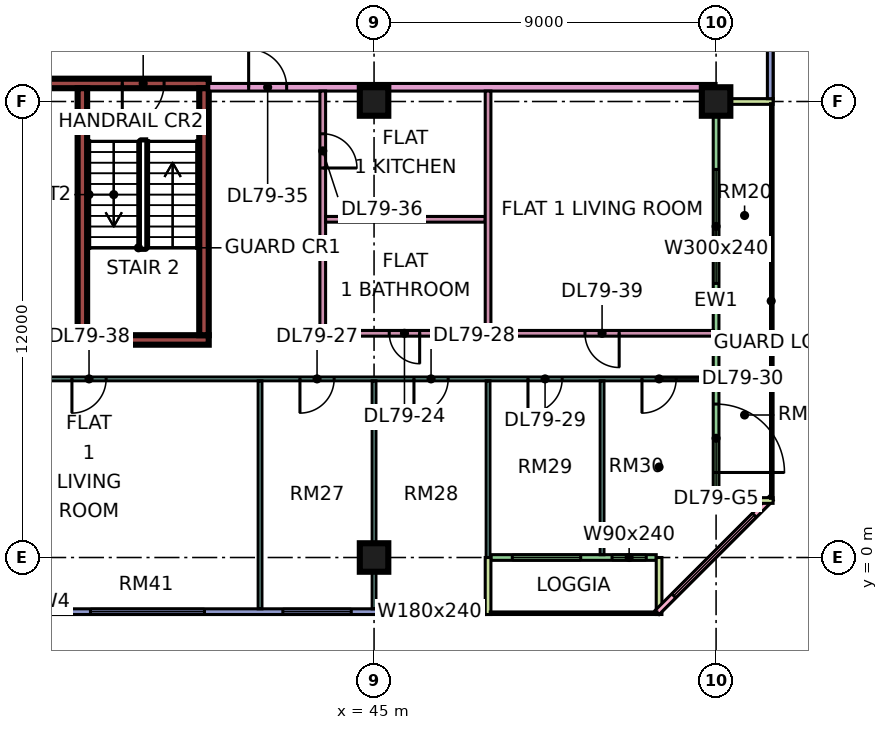
"""IFC4 building model, lengths in metres.
Left out: names, types, materials, properties, quantities, classifications, styles, units other than length and angle.
Written with IfcOpenShell. Run it as: python <this file> out.ifc"""

import sys

from ifc_helpers import new_model, si_unit, direction, frame, frame_2d, origin, origin_2d, place, context, subcontext, project, spatial, rectangle, extrude, element, fill, save


model = new_model("IFC4")
c1 = context("Model", 3, precision=1e-05, world=origin(), true_north=direction((0.0, 1.0)))
c2 = subcontext(c1, "Body", "Model", "MODEL_VIEW")
j1 = project(units=[si_unit("LENGTHUNIT", "METRE"), si_unit("PLANEANGLEUNIT", "RADIAN")], contexts=[c1])
p1 = place(None, origin())
s1 = spatial("IfcSite", under=j1, at=p1, CompositionType="ELEMENT")
p2 = place(p1, origin())
s2 = spatial("IfcBuilding", under=s1, at=p2, CompositionType="ELEMENT")
p3 = place(p2, frame((0.0, 0.0, 342.65)))
s3 = spatial("IfcBuildingStorey", under=s2, at=p3, CompositionType="ELEMENT", Elevation=342.65)
for number, where, z_axis, x_axis in (
    (1, (45.0, 0.0, 0.0), (0.0, 0.0, 1.0), (1.0, 0.0, 0.0)),
    (2, (45.0, 12.0, 0.0), (0.0, 0.0, 1.0), (1.0, 0.0, 0.0)),
    (3, (54.0, 12.0, 0.0), (0.0, 0.0, 1.0), (1.0, 0.0, 0.0)),
):
    element("IfcColumn", number, at=place(p3, frame(where, z_axis=z_axis, x_axis=x_axis)), inside=s3, PredefinedType="COLUMN", context=c2, shape_type="SweptSolid", body=[
        extrude(rectangle(XDim=0.75, YDim=0.75, at=origin_2d()), origin(), (0.0, 0.0, 1.0), 3.75),
    ])
p4 = place(p3, frame((37.2, 5.725, 0.0), z_axis=(0.0, 0.0, 1.0), x_axis=(1.0, 0.0, 0.0)))
e4 = element("IfcWall", 4, at=p4, inside=s3, PredefinedType="SHEAR", context=c2, shape_type="SweptSolid", body=[
    extrude(rectangle(XDim=3.45, YDim=0.25, at=frame_2d((1.725, 0.0))), origin(), (0.0, 0.0, 1.0), 3.75),
])
p5 = place(p3, frame((36.375, 12.475, 0.0), z_axis=(0.0, 0.0, 1.0), x_axis=(1.0, 0.0, 0.0)))
e5 = element("IfcWall", 5, at=p5, inside=s3, PredefinedType="SHEAR", context=c2, shape_type="SweptSolid", body=[
    extrude(rectangle(XDim=4.275, YDim=0.25, at=frame_2d((2.137, 0.0))), origin(), (0.0, 0.0, 1.0), 3.75),
])
p6 = place(p5, frame((2.0, 0.0, 0.0)))
e6 = element("IfcOpeningElement", 6, at=p6, cuts=e5, PredefinedType="OPENING", context=c2, shape_type="SweptSolid", body=[
    extrude(rectangle(XDim=1.1, YDim=2.2, at=frame_2d((0.55, 1.1))), frame((0.0, 0.135, 0.0), z_axis=(0.0, -1.0, 0.0), x_axis=(1.0, 0.0, 0.0)), (0.0, 0.0, 1.0), 0.27),
])
for number, where, z_axis, x_axis in (
    (7, (37.325, 5.85, 0.0), (0.0, 0.0, 1.0), (0.0, 1.0, 0.0)),
    (8, (40.525, 5.85, 0.0), (0.0, 0.0, 1.0), (0.0, 1.0, 0.0)),
):
    element("IfcWall", number, at=place(p3, frame(where, z_axis=z_axis, x_axis=x_axis)), inside=s3, PredefinedType="SHEAR", context=c2, shape_type="SweptSolid", body=[
        extrude(rectangle(XDim=6.5, YDim=0.25, at=frame_2d((3.25, 0.0))), origin(), (0.0, 0.0, 1.0), 3.75),
    ])
p7 = place(p3, frame((36.075, -1.425, 0.0), z_axis=(0.0, 0.0, 1.0), x_axis=(1.0, 0.0, 0.0)))
e9 = element("IfcWall", 9, at=p7, inside=s3, PredefinedType="SOLIDWALL", context=c2, shape_type="SweptSolid", body=[
    extrude(rectangle(XDim=11.85, YDim=0.15, at=frame_2d((5.925, 0.0))), origin(), (0.0, 0.0, 1.0), 3.35),
])
p8 = place(p7, frame((1.462, 0.0, 0.45)))
e10 = element("IfcOpeningElement", 10, at=p8, cuts=e9, PredefinedType="OPENING", context=c2, shape_type="SweptSolid", body=[
    extrude(rectangle(XDim=3.0, YDim=2.4, at=frame_2d((1.5, 1.2))), frame((0.0, 0.085, 0.0), z_axis=(0.0, -1.0, 0.0), x_axis=(1.0, 0.0, 0.0)), (0.0, 0.0, 1.0), 0.17),
])
p9 = place(p7, frame((6.525, 0.0, 0.45)))
e11 = element("IfcOpeningElement", 11, at=p9, cuts=e9, PredefinedType="OPENING", context=c2, shape_type="SweptSolid", body=[
    extrude(rectangle(XDim=1.8, YDim=2.4, at=frame_2d((0.9, 1.2))), frame((0.0, 0.085, 0.0), z_axis=(0.0, -1.0, 0.0), x_axis=(1.0, 0.0, 0.0)), (0.0, 0.0, 1.0), 0.17),
])
p10 = place(p7, frame((9.488, 0.0, 0.45)))
e12 = element("IfcOpeningElement", 12, at=p10, cuts=e9, PredefinedType="OPENING", context=c2, shape_type="SweptSolid", body=[
    extrude(rectangle(XDim=1.8, YDim=2.4, at=frame_2d((0.9, 1.2))), frame((0.0, 0.085, 0.0), z_axis=(0.0, -1.0, 0.0), x_axis=(1.0, 0.0, 0.0)), (0.0, 0.0, 1.0), 0.17),
])
p11 = place(p3, frame((48.075, 0.0, 0.0), z_axis=(0.0, 0.0, 1.0), x_axis=(1.0, 0.0, 0.0)))
e13 = element("IfcWall", 13, at=p11, inside=s3, PredefinedType="SOLIDWALL", context=c2, shape_type="SweptSolid", body=[
    extrude(rectangle(XDim=4.35, YDim=0.15, at=frame_2d((2.175, 0.0))), origin(), (0.0, 0.0, 1.0), 3.35),
])
p12 = place(p11, frame((0.562, 0.0, 0.45)))
e14 = element("IfcOpeningElement", 14, at=p12, cuts=e13, PredefinedType="OPENING", context=c2, shape_type="SweptSolid", body=[
    extrude(rectangle(XDim=1.8, YDim=2.4, at=frame_2d((0.9, 1.2))), frame((0.0, 0.085, 0.0), z_axis=(0.0, -1.0, 0.0), x_axis=(1.0, 0.0, 0.0)), (0.0, 0.0, 1.0), 0.17),
])
p13 = place(p11, frame((3.188, 0.0, 0.45)))
e15 = element("IfcOpeningElement", 15, at=p13, cuts=e13, PredefinedType="OPENING", context=c2, shape_type="SweptSolid", body=[
    extrude(rectangle(XDim=0.9, YDim=2.4, at=frame_2d((0.45, 1.2))), frame((0.0, 0.085, 0.0), z_axis=(0.0, -1.0, 0.0), x_axis=(1.0, 0.0, 0.0)), (0.0, 0.0, 1.0), 0.17),
])
for number, where, z_axis, x_axis in (
    (16, (48.0, -1.5, 0.0), (0.0, 0.0, 1.0), (0.0, 1.0, 0.0)),
    (17, (52.5, -1.5, 0.0), (0.0, 0.0, 1.0), (0.0, 1.0, 0.0)),
):
    element("IfcWall", number, at=place(p3, frame(where, z_axis=z_axis, x_axis=x_axis)), inside=s3, PredefinedType="SOLIDWALL", context=c2, shape_type="SweptSolid", body=[
        extrude(rectangle(XDim=1.5, YDim=0.15, at=frame_2d((0.75, 0.0))), origin(), (0.0, 0.0, 1.0), 3.35),
    ])
p14 = place(p3, frame((52.447, -1.447, 0.0), z_axis=(0.0, 0.0, 1.0), x_axis=(0.707106781187, 0.707106781187, 0.0)))
e18 = element("IfcWall", 18, at=p14, inside=s3, PredefinedType="SOLIDWALL", context=c2, shape_type="SweptSolid", body=[
    extrude(rectangle(XDim=4.243, YDim=0.15, at=frame_2d((2.121, 0.0))), origin(), (0.0, 0.0, 1.0), 3.35),
])
p15 = place(p14, frame((0.621, 0.0, 0.45)))
e19 = element("IfcOpeningElement", 19, at=p15, cuts=e18, PredefinedType="OPENING", context=c2, shape_type="SweptSolid", body=[
    extrude(rectangle(XDim=3.0, YDim=2.4, at=frame_2d((1.5, 1.2))), frame((0.0, 0.085, 0.0), z_axis=(0.0, -1.0, 0.0), x_axis=(1.0, 0.0, 0.0)), (0.0, 0.0, 1.0), 0.17),
])
p16 = place(p3, frame((54.0, 1.575, 0.0), z_axis=(0.0, 0.0, 1.0), x_axis=(0.0, 1.0, 0.0)))
e20 = element("IfcWall", 20, at=p16, inside=s3, PredefinedType="SOLIDWALL", context=c2, shape_type="SweptSolid", body=[
    extrude(rectangle(XDim=10.35, YDim=0.15, at=frame_2d((5.175, 0.0))), origin(), (0.0, 0.0, 1.0), 3.35),
])
p17 = place(p16, frame((0.663, 0.0, 0.0)))
e21 = element("IfcOpeningElement", 21, at=p17, cuts=e20, PredefinedType="OPENING", context=c2, shape_type="SweptSolid", body=[
    extrude(rectangle(XDim=1.8, YDim=2.4, at=frame_2d((0.9, 1.2))), frame((0.0, 0.085, 0.0), z_axis=(0.0, -1.0, 0.0), x_axis=(1.0, 0.0, 0.0)), (0.0, 0.0, 1.0), 0.17),
])
p18 = place(p16, frame((5.637, 0.0, 0.45)))
e22 = element("IfcOpeningElement", 22, at=p18, cuts=e20, PredefinedType="OPENING", context=c2, shape_type="SweptSolid", body=[
    extrude(rectangle(XDim=3.0, YDim=2.4, at=frame_2d((1.5, 1.2))), frame((0.0, 0.085, 0.0), z_axis=(0.0, -1.0, 0.0), x_axis=(1.0, 0.0, 0.0)), (0.0, 0.0, 1.0), 0.17),
])
for number, where, z_axis, x_axis in (
    (23, (55.5, 1.5, 0.0), (0.0, 0.0, 1.0), (-1.0, 0.0, 0.0)),
    (24, (55.5, 12.0, 0.0), (0.0, 0.0, 1.0), (-1.0, 0.0, 0.0)),
):
    element("IfcWall", number, at=place(p3, frame(where, z_axis=z_axis, x_axis=x_axis)), inside=s3, PredefinedType="SOLIDWALL", context=c2, shape_type="SweptSolid", body=[
        extrude(rectangle(XDim=1.5, YDim=0.15, at=frame_2d((0.75, 0.0))), origin(), (0.0, 0.0, 1.0), 3.35),
    ])
p19 = place(p3, frame((55.425, 12.075, 0.0), z_axis=(0.0, 0.0, 1.0), x_axis=(0.0, 1.0, 0.0)))
e25 = element("IfcWall", 25, at=p19, inside=s3, PredefinedType="SOLIDWALL", context=c2, shape_type="SweptSolid", body=[
    extrude(rectangle(XDim=10.425, YDim=0.15, at=frame_2d((5.212, 0.0))), origin(), (0.0, 0.0, 1.0), 3.35),
])
p20 = place(p19, frame((4.575, 0.0, 0.45)))
e26 = element("IfcOpeningElement", 26, at=p20, cuts=e25, PredefinedType="OPENING", context=c2, shape_type="SweptSolid", body=[
    extrude(rectangle(XDim=4.8, YDim=2.4, at=frame_2d((2.4, 1.2))), frame((0.0, 0.085, 0.0), z_axis=(0.0, -1.0, 0.0), x_axis=(1.0, 0.0, 0.0)), (0.0, 0.0, 1.0), 0.17),
])
p21 = place(p3, frame((33.05, 4.7, 0.0), z_axis=(0.0, 0.0, 1.0), x_axis=(1.0, 0.0, 0.0)))
e27 = element("IfcWall", 27, at=p21, inside=s3, PredefinedType="PARTITIONING", context=c2, shape_type="SweptSolid", body=[
    extrude(rectangle(XDim=20.876, YDim=0.1, at=frame_2d((10.438, 0.0))), origin(), (0.0, 0.0, 1.0), 3.35),
])
p22 = place(p21, frame((10.0, 0.0, 0.0)))
e28 = element("IfcOpeningElement", 28, at=p22, cuts=e27, PredefinedType="OPENING", context=c2, shape_type="SweptSolid", body=[
    extrude(rectangle(XDim=0.9, YDim=2.1, at=frame_2d((0.45, 1.05))), frame((0.0, 0.06, 0.0), z_axis=(0.0, -1.0, 0.0), x_axis=(1.0, 0.0, 0.0)), (0.0, 0.0, 1.0), 0.12),
])
p23 = place(p21, frame((13.0, 0.0, 0.0)))
e29 = element("IfcOpeningElement", 29, at=p23, cuts=e27, PredefinedType="OPENING", context=c2, shape_type="SweptSolid", body=[
    extrude(rectangle(XDim=0.9, YDim=2.1, at=frame_2d((0.45, 1.05))), frame((0.0, 0.06, 0.0), z_axis=(0.0, -1.0, 0.0), x_axis=(1.0, 0.0, 0.0)), (0.0, 0.0, 1.0), 0.12),
])
p24 = place(p21, frame((16.0, 0.0, 0.0)))
e30 = element("IfcOpeningElement", 30, at=p24, cuts=e27, PredefinedType="OPENING", context=c2, shape_type="SweptSolid", body=[
    extrude(rectangle(XDim=0.9, YDim=2.1, at=frame_2d((0.45, 1.05))), frame((0.0, 0.06, 0.0), z_axis=(0.0, -1.0, 0.0), x_axis=(1.0, 0.0, 0.0)), (0.0, 0.0, 1.0), 0.12),
])
p25 = place(p21, frame((19.0, 0.0, 0.0)))
e31 = element("IfcOpeningElement", 31, at=p25, cuts=e27, PredefinedType="OPENING", context=c2, shape_type="SweptSolid", body=[
    extrude(rectangle(XDim=0.9, YDim=2.1, at=frame_2d((0.45, 1.05))), frame((0.0, 0.06, 0.0), z_axis=(0.0, -1.0, 0.0), x_axis=(1.0, 0.0, 0.0)), (0.0, 0.0, 1.0), 0.12),
])
p26 = place(p21, frame((4.0, 0.0, 0.0)))
e32 = element("IfcOpeningElement", 32, at=p26, cuts=e27, PredefinedType="OPENING", context=c2, shape_type="SweptSolid", body=[
    extrude(rectangle(XDim=0.9, YDim=2.1, at=frame_2d((0.45, 1.05))), frame((0.0, 0.06, 0.0), z_axis=(0.0, -1.0, 0.0), x_axis=(1.0, 0.0, 0.0)), (0.0, 0.0, 1.0), 0.12),
])
p27 = place(p3, frame((40.65, 12.375, 0.0), z_axis=(0.0, 0.0, 1.0), x_axis=(1.0, 0.0, 0.0)))
e33 = element("IfcWall", 33, at=p27, inside=s3, PredefinedType="PARTITIONING", context=c2, shape_type="SweptSolid", body=[
    extrude(rectangle(XDim=13.35, YDim=0.2, at=frame_2d((6.675, 0.0))), origin(), (0.0, 0.0, 1.0), 3.35),
])
p28 = place(p27, frame((1.05, 0.0, 0.0)))
e34 = element("IfcOpeningElement", 34, at=p28, cuts=e33, PredefinedType="OPENING", context=c2, shape_type="SweptSolid", body=[
    extrude(rectangle(XDim=1.0, YDim=2.1, at=frame_2d((0.5, 1.05))), frame((0.0, 0.11, 0.0), z_axis=(0.0, -1.0, 0.0), x_axis=(1.0, 0.0, 0.0)), (0.0, 0.0, 1.0), 0.22),
])
p29 = place(p3, frame((42.0, -1.35, 0.0), z_axis=(0.0, 0.0, 1.0), x_axis=(0.0, 1.0, 0.0)))
e35 = element("IfcWall", 35, at=p29, inside=s3, PredefinedType="PARTITIONING", context=c2, shape_type="SweptSolid", body=[
    extrude(rectangle(XDim=6.0, YDim=0.1, at=frame_2d((3.0, 0.0))), origin(), (0.0, 0.0, 1.0), 3.35),
])
p30 = place(p3, frame((43.575, 5.9, 0.0), z_axis=(0.0, 0.0, 1.0), x_axis=(1.0, 0.0, 0.0)))
e36 = element("IfcWall", 36, at=p30, inside=s3, PredefinedType="PARTITIONING", context=c2, shape_type="SweptSolid", body=[
    extrude(rectangle(XDim=10.351, YDim=0.15, at=frame_2d((5.176, 0.0))), origin(), (0.0, 0.0, 1.0), 3.35),
])
p31 = place(p30, frame((1.825, 0.0, 0.0)))
e37 = element("IfcOpeningElement", 37, at=p31, cuts=e36, PredefinedType="OPENING", context=c2, shape_type="SweptSolid", body=[
    extrude(rectangle(XDim=0.8, YDim=2.1, at=frame_2d((0.4, 1.05))), frame((0.0, 0.085, 0.0), z_axis=(0.0, -1.0, 0.0), x_axis=(1.0, 0.0, 0.0)), (0.0, 0.0, 1.0), 0.17),
])
p32 = place(p30, frame((6.975, 0.0, 0.0)))
e38 = element("IfcOpeningElement", 38, at=p32, cuts=e36, PredefinedType="OPENING", context=c2, shape_type="SweptSolid", body=[
    extrude(rectangle(XDim=0.9, YDim=2.1, at=frame_2d((0.45, 1.05))), frame((0.0, 0.085, 0.0), z_axis=(0.0, -1.0, 0.0), x_axis=(1.0, 0.0, 0.0)), (0.0, 0.0, 1.0), 0.17),
])
p33 = place(p3, frame((43.65, 5.975, 0.0), z_axis=(0.0, 0.0, 1.0), x_axis=(0.0, 1.0, 0.0)))
e39 = element("IfcWall", 39, at=p33, inside=s3, PredefinedType="PARTITIONING", context=c2, shape_type="SweptSolid", body=[
    extrude(rectangle(XDim=6.3, YDim=0.15, at=frame_2d((3.15, 0.0))), origin(), (0.0, 0.0, 1.0), 3.35),
])
p34 = place(p33, frame((4.275, 0.0, 0.0)))
e40 = element("IfcOpeningElement", 40, at=p34, cuts=e39, PredefinedType="OPENING", context=c2, shape_type="SweptSolid", body=[
    extrude(rectangle(XDim=0.9, YDim=2.1, at=frame_2d((0.45, 1.05))), frame((0.0, 0.085, 0.0), z_axis=(0.0, -1.0, 0.0), x_axis=(1.0, 0.0, 0.0)), (0.0, 0.0, 1.0), 0.17),
])
p35 = place(p3, frame((43.725, 8.9, 0.0), z_axis=(0.0, 0.0, 1.0), x_axis=(1.0, 0.0, 0.0)))
e41 = element("IfcWall", 41, at=p35, inside=s3, PredefinedType="PARTITIONING", context=c2, shape_type="SweptSolid", body=[
    extrude(rectangle(XDim=4.2, YDim=0.15, at=frame_2d((2.1, 0.0))), origin(), (0.0, 0.0, 1.0), 3.35),
])
p36 = place(p3, frame((45.0, -1.351, 0.0), z_axis=(0.0, 0.0, 1.0), x_axis=(0.0, 1.0, 0.0)))
e42 = element("IfcWall", 42, at=p36, inside=s3, PredefinedType="PARTITIONING", context=c2, shape_type="SweptSolid", body=[
    extrude(rectangle(XDim=6.001, YDim=0.1, at=frame_2d((3.0, 0.0))), origin(), (0.0, 0.0, 1.0), 3.35),
])
p37 = place(p3, frame((48.0, 0.0, 0.0), z_axis=(0.0, 0.0, 1.0), x_axis=(0.0, 1.0, 0.0)))
e43 = element("IfcWall", 43, at=p37, inside=s3, PredefinedType="PARTITIONING", context=c2, shape_type="SweptSolid", body=[
    extrude(rectangle(XDim=4.65, YDim=0.1, at=frame_2d((2.325, 0.0))), origin(), (0.0, 0.0, 1.0), 3.35),
])
p38 = place(p3, frame((48.0, 5.975, 0.0), z_axis=(0.0, 0.0, 1.0), x_axis=(0.0, 1.0, 0.0)))
e44 = element("IfcWall", 44, at=p38, inside=s3, PredefinedType="PARTITIONING", context=c2, shape_type="SweptSolid", body=[
    extrude(rectangle(XDim=6.3, YDim=0.15, at=frame_2d((3.15, 0.0))), origin(), (0.0, 0.0, 1.0), 3.35),
])
p39 = place(p3, frame((51.0, 0.074, 0.0), z_axis=(0.0, 0.0, 1.0), x_axis=(0.0, 1.0, 0.0)))
e45 = element("IfcWall", 45, at=p39, inside=s3, PredefinedType="PARTITIONING", context=c2, shape_type="SweptSolid", body=[
    extrude(rectangle(XDim=4.576, YDim=0.1, at=frame_2d((2.288, 0.0))), origin(), (0.0, 0.0, 1.0), 3.35),
])
p40 = place(p8, origin())
e46 = element("IfcWindow", 46, at=p40, inside=s3, PartitioningType="SINGLE_PANEL", PredefinedType="WINDOW", context=c2, shape_type="SweptSolid", body=[
    extrude(rectangle(XDim=3.0, YDim=2.4, at=frame_2d((1.5, 1.2))), frame((0.0, 0.03, 0.0), z_axis=(0.0, -1.0, 0.0), x_axis=(1.0, 0.0, 0.0)), (0.0, 0.0, 1.0), 0.06),
])
fill(e10, e46)
p41 = place(p9, origin())
e47 = element("IfcWindow", 47, at=p41, inside=s3, PartitioningType="SINGLE_PANEL", PredefinedType="WINDOW", context=c2, shape_type="SweptSolid", body=[
    extrude(rectangle(XDim=1.8, YDim=2.4, at=frame_2d((0.9, 1.2))), frame((0.0, 0.03, 0.0), z_axis=(0.0, -1.0, 0.0), x_axis=(1.0, 0.0, 0.0)), (0.0, 0.0, 1.0), 0.06),
])
fill(e11, e47)
p42 = place(p10, origin())
e48 = element("IfcWindow", 48, at=p42, inside=s3, PartitioningType="SINGLE_PANEL", PredefinedType="WINDOW", context=c2, shape_type="SweptSolid", body=[
    extrude(rectangle(XDim=1.8, YDim=2.4, at=frame_2d((0.9, 1.2))), frame((0.0, 0.03, 0.0), z_axis=(0.0, -1.0, 0.0), x_axis=(1.0, 0.0, 0.0)), (0.0, 0.0, 1.0), 0.06),
])
fill(e12, e48)
p43 = place(p12, origin())
e49 = element("IfcWindow", 49, at=p43, inside=s3, PartitioningType="SINGLE_PANEL", PredefinedType="WINDOW", context=c2, shape_type="SweptSolid", body=[
    extrude(rectangle(XDim=1.8, YDim=2.4, at=frame_2d((0.9, 1.2))), frame((0.0, 0.03, 0.0), z_axis=(0.0, -1.0, 0.0), x_axis=(1.0, 0.0, 0.0)), (0.0, 0.0, 1.0), 0.06),
])
fill(e14, e49)
p44 = place(p13, origin())
e50 = element("IfcWindow", 50, at=p44, inside=s3, PartitioningType="SINGLE_PANEL", PredefinedType="WINDOW", context=c2, shape_type="SweptSolid", body=[
    extrude(rectangle(XDim=0.9, YDim=2.4, at=frame_2d((0.45, 1.2))), frame((0.0, 0.03, 0.0), z_axis=(0.0, -1.0, 0.0), x_axis=(1.0, 0.0, 0.0)), (0.0, 0.0, 1.0), 0.06),
])
fill(e15, e50)
p45 = place(p15, origin())
e51 = element("IfcWindow", 51, at=p45, inside=s3, PartitioningType="SINGLE_PANEL", PredefinedType="WINDOW", context=c2, shape_type="SweptSolid", body=[
    extrude(rectangle(XDim=3.0, YDim=2.4, at=frame_2d((1.5, 1.2))), frame((0.0, 0.03, 0.0), z_axis=(0.0, -1.0, 0.0), x_axis=(1.0, 0.0, 0.0)), (0.0, 0.0, 1.0), 0.06),
])
fill(e19, e51)
p46 = place(p17, frame((1.8, 0.0, 0.0), z_axis=(0.0, 0.0, 1.0), x_axis=(-1.0, 0.0, 0.0)))
e52 = element("IfcDoor", 52, at=p46, inside=s3, OperationType="DOUBLE_DOOR_SINGLE_SWING", PredefinedType="DOOR", context=c2, shape_type="SweptSolid", body=[
    extrude(rectangle(XDim=1.8, YDim=2.4, at=frame_2d((0.9, 1.2))), frame((0.0, 0.025, 0.0), z_axis=(0.0, -1.0, 0.0), x_axis=(1.0, 0.0, 0.0)), (0.0, 0.0, 1.0), 0.05),
])
fill(e21, e52)
p47 = place(p18, origin())
e53 = element("IfcWindow", 53, at=p47, inside=s3, PartitioningType="SINGLE_PANEL", PredefinedType="WINDOW", context=c2, shape_type="SweptSolid", body=[
    extrude(rectangle(XDim=3.0, YDim=2.4, at=frame_2d((1.5, 1.2))), frame((0.0, 0.03, 0.0), z_axis=(0.0, -1.0, 0.0), x_axis=(1.0, 0.0, 0.0)), (0.0, 0.0, 1.0), 0.06),
])
fill(e22, e53)
p48 = place(p6, frame((1.1, 0.0, 0.0), z_axis=(0.0, 0.0, 1.0), x_axis=(-1.0, 0.0, 0.0)))
e54 = element("IfcDoor", 54, at=p48, inside=s3, OperationType="SINGLE_SWING_LEFT", PredefinedType="DOOR", context=c2, shape_type="SweptSolid", body=[
    extrude(rectangle(XDim=1.1, YDim=2.2, at=frame_2d((0.55, 1.1))), frame((0.0, 0.025, 0.0), z_axis=(0.0, -1.0, 0.0), x_axis=(1.0, 0.0, 0.0)), (0.0, 0.0, 1.0), 0.05),
])
fill(e6, e54)
p49 = place(p31, origin())
e55 = element("IfcDoor", 55, at=p49, inside=s3, OperationType="SINGLE_SWING_RIGHT", PredefinedType="DOOR", context=c2, shape_type="SweptSolid", body=[
    extrude(rectangle(XDim=0.8, YDim=2.1, at=frame_2d((0.4, 1.05))), frame((0.0, 0.025, 0.0), z_axis=(0.0, -1.0, 0.0), x_axis=(1.0, 0.0, 0.0)), (0.0, 0.0, 1.0), 0.05),
])
fill(e37, e55)
p50 = place(p22, frame((0.9, 0.0, 0.0), z_axis=(0.0, 0.0, 1.0), x_axis=(-1.0, 0.0, 0.0)))
e56 = element("IfcDoor", 56, at=p50, inside=s3, OperationType="SINGLE_SWING_LEFT", PredefinedType="DOOR", context=c2, shape_type="SweptSolid", body=[
    extrude(rectangle(XDim=0.9, YDim=2.1, at=frame_2d((0.45, 1.05))), frame((0.0, 0.025, 0.0), z_axis=(0.0, -1.0, 0.0), x_axis=(1.0, 0.0, 0.0)), (0.0, 0.0, 1.0), 0.05),
])
fill(e28, e56)
p51 = place(p23, frame((0.9, 0.0, 0.0), z_axis=(0.0, 0.0, 1.0), x_axis=(-1.0, 0.0, 0.0)))
e57 = element("IfcDoor", 57, at=p51, inside=s3, OperationType="SINGLE_SWING_LEFT", PredefinedType="DOOR", context=c2, shape_type="SweptSolid", body=[
    extrude(rectangle(XDim=0.9, YDim=2.1, at=frame_2d((0.45, 1.05))), frame((0.0, 0.025, 0.0), z_axis=(0.0, -1.0, 0.0), x_axis=(1.0, 0.0, 0.0)), (0.0, 0.0, 1.0), 0.05),
])
fill(e29, e57)
p52 = place(p24, frame((0.9, 0.0, 0.0), z_axis=(0.0, 0.0, 1.0), x_axis=(-1.0, 0.0, 0.0)))
e58 = element("IfcDoor", 58, at=p52, inside=s3, OperationType="SINGLE_SWING_LEFT", PredefinedType="DOOR", context=c2, shape_type="SweptSolid", body=[
    extrude(rectangle(XDim=0.9, YDim=2.1, at=frame_2d((0.45, 1.05))), frame((0.0, 0.025, 0.0), z_axis=(0.0, -1.0, 0.0), x_axis=(1.0, 0.0, 0.0)), (0.0, 0.0, 1.0), 0.05),
])
fill(e30, e58)
p53 = place(p25, frame((0.9, 0.0, 0.0), z_axis=(0.0, 0.0, 1.0), x_axis=(-1.0, 0.0, 0.0)))
e59 = element("IfcDoor", 59, at=p53, inside=s3, OperationType="SINGLE_SWING_LEFT", PredefinedType="DOOR", context=c2, shape_type="SweptSolid", body=[
    extrude(rectangle(XDim=0.9, YDim=2.1, at=frame_2d((0.45, 1.05))), frame((0.0, 0.025, 0.0), z_axis=(0.0, -1.0, 0.0), x_axis=(1.0, 0.0, 0.0)), (0.0, 0.0, 1.0), 0.05),
])
fill(e31, e59)
p54 = place(p28, origin())
e60 = element("IfcDoor", 60, at=p54, inside=s3, OperationType="SINGLE_SWING_LEFT", PredefinedType="DOOR", context=c2, shape_type="SweptSolid", body=[
    extrude(rectangle(XDim=1.0, YDim=2.1, at=frame_2d((0.5, 1.05))), frame((0.0, 0.025, 0.0), z_axis=(0.0, -1.0, 0.0), x_axis=(1.0, 0.0, 0.0)), (0.0, 0.0, 1.0), 0.05),
])
fill(e34, e60)
p55 = place(p34, frame((0.9, 0.0, 0.0), z_axis=(0.0, 0.0, 1.0), x_axis=(-1.0, 0.0, 0.0)))
e61 = element("IfcDoor", 61, at=p55, inside=s3, OperationType="SINGLE_SWING_LEFT", PredefinedType="DOOR", context=c2, shape_type="SweptSolid", body=[
    extrude(rectangle(XDim=0.9, YDim=2.1, at=frame_2d((0.45, 1.05))), frame((0.0, 0.025, 0.0), z_axis=(0.0, -1.0, 0.0), x_axis=(1.0, 0.0, 0.0)), (0.0, 0.0, 1.0), 0.05),
])
fill(e40, e61)
p56 = place(p26, frame((0.9, 0.0, 0.0), z_axis=(0.0, 0.0, 1.0), x_axis=(-1.0, 0.0, 0.0)))
e62 = element("IfcDoor", 62, at=p56, inside=s3, OperationType="SINGLE_SWING_LEFT", PredefinedType="DOOR", context=c2, shape_type="SweptSolid", body=[
    extrude(rectangle(XDim=0.9, YDim=2.1, at=frame_2d((0.45, 1.05))), frame((0.0, 0.025, 0.0), z_axis=(0.0, -1.0, 0.0), x_axis=(1.0, 0.0, 0.0)), (0.0, 0.0, 1.0), 0.05),
])
fill(e32, e62)
p57 = place(p32, origin())
e63 = element("IfcDoor", 63, at=p57, inside=s3, OperationType="SINGLE_SWING_RIGHT", PredefinedType="DOOR", context=c2, shape_type="SweptSolid", body=[
    extrude(rectangle(XDim=0.9, YDim=2.1, at=frame_2d((0.45, 1.05))), frame((0.0, 0.025, 0.0), z_axis=(0.0, -1.0, 0.0), x_axis=(1.0, 0.0, 0.0)), (0.0, 0.0, 1.0), 0.05),
])
fill(e38, e63)
save(model, sys.argv[1])
